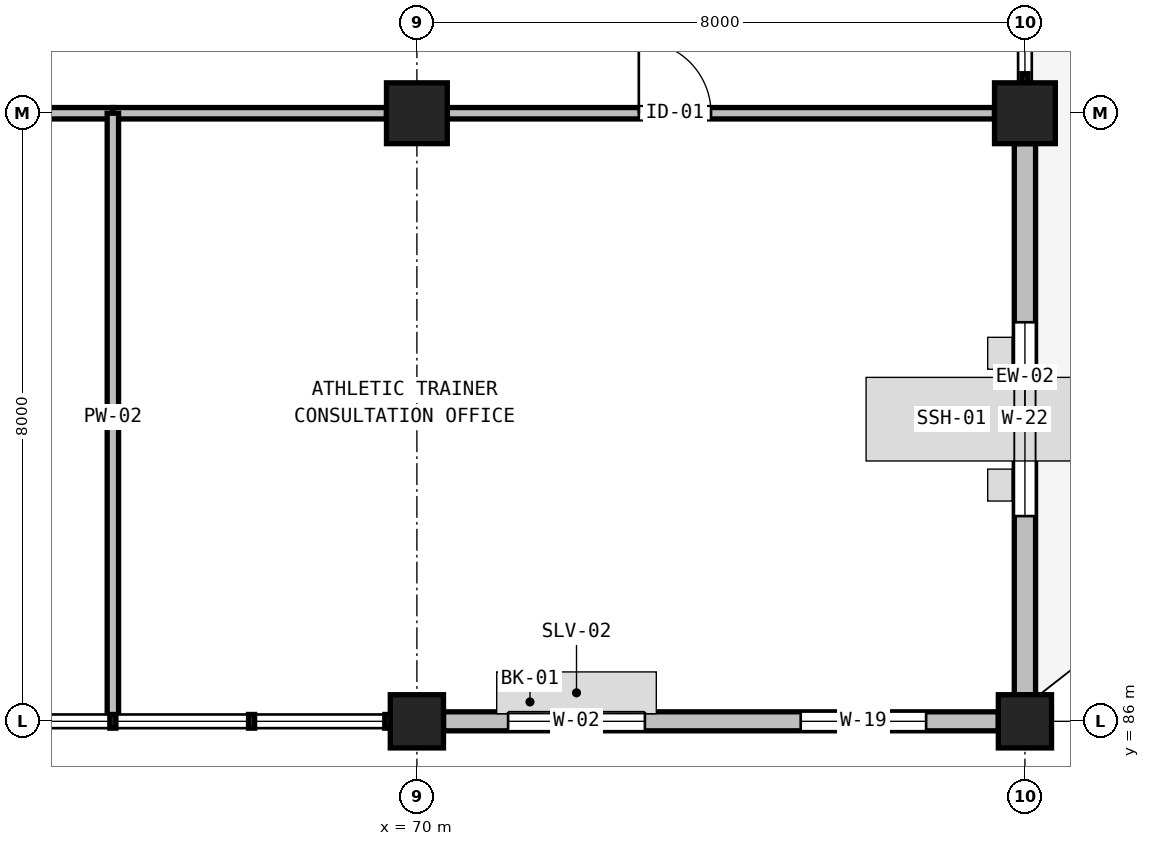
"""IFC4 building model, lengths in metres.
Left out: names, types, materials, properties, quantities, classifications, styles, units other than length and angle.
Written with IfcOpenShell. Run it as: python <this file> out.ifc"""

import sys

from ifc_helpers import new_model, si_unit, direction, frame, frame_2d, origin, origin_2d, place, context, subcontext, project, spatial, rectangle, extrude, element, fill, save


model = new_model("IFC4")
c1 = context("Model", 3, precision=1e-05, world=origin(), true_north=direction((0.0, 1.0)))
c2 = subcontext(c1, "Body", "Model", "MODEL_VIEW")
j1 = project(units=[si_unit("LENGTHUNIT", "METRE"), si_unit("PLANEANGLEUNIT", "RADIAN")], contexts=[c1])
p1 = place(None, origin())
s1 = spatial("IfcSite", under=j1, at=p1, CompositionType="ELEMENT")
p2 = place(p1, origin())
s2 = spatial("IfcBuilding", under=s1, at=p2, CompositionType="ELEMENT")
p3 = place(p2, frame((0.0, 0.0, 5.4)))
s3 = spatial("IfcBuildingStorey", under=s2, at=p3, CompositionType="ELEMENT", Elevation=5.4)
p4 = place(p3, frame((70.0, 86.0, 0.0), z_axis=(0.0, 0.0, 1.0), x_axis=(1.0, 0.0, 0.0)))
e1 = element("IfcColumn", 1, at=p4, inside=s3, PredefinedType="COLUMN", context=c2, shape_type="SweptSolid", body=[
    extrude(rectangle(XDim=0.7, YDim=0.7, at=origin_2d()), origin(), (0.0, 0.0, 1.0), 5.4),
])
p5 = place(p3, frame((70.0, 94.0, 0.0), z_axis=(0.0, 0.0, 1.0), x_axis=(1.0, 0.0, 0.0)))
e2 = element("IfcColumn", 2, at=p5, inside=s3, PredefinedType="COLUMN", context=c2, shape_type="SweptSolid", body=[
    extrude(rectangle(XDim=0.8, YDim=0.8, at=origin_2d()), origin(), (0.0, 0.0, 1.0), 5.4),
])
p6 = place(p3, frame((78.0, 86.0, 0.0), z_axis=(0.0, 0.0, 1.0), x_axis=(1.0, 0.0, 0.0)))
e3 = element("IfcColumn", 3, at=p6, inside=s3, PredefinedType="COLUMN", context=c2, shape_type="SweptSolid", body=[
    extrude(rectangle(XDim=0.7, YDim=0.7, at=origin_2d()), origin(), (0.0, 0.0, 1.0), 5.4),
])
p7 = place(p3, frame((78.0, 94.0, 0.0), z_axis=(0.0, 0.0, 1.0), x_axis=(1.0, 0.0, 0.0)))
e4 = element("IfcColumn", 4, at=p7, inside=s3, PredefinedType="COLUMN", context=c2, shape_type="SweptSolid", body=[
    extrude(rectangle(XDim=0.8, YDim=0.8, at=origin_2d()), origin(), (0.0, 0.0, 1.0), 5.4),
])
p8 = place(p3, frame((70.35, 86.0, 0.0), z_axis=(0.0, 0.0, 1.0), x_axis=(1.0, 0.0, 0.0)))
e5 = element("IfcWall", 5, at=p8, inside=s3, PredefinedType="SOLIDWALL", context=c2, shape_type="SweptSolid", body=[
    extrude(rectangle(XDim=7.3, YDim=0.25, at=frame_2d((3.65, 0.0))), origin(), (0.0, 0.0, 1.0), 4.34),
])
p9 = place(p8, frame((0.85, 0.0, 0.9)))
e6 = element("IfcOpeningElement", 6, at=p9, cuts=e5, PredefinedType="OPENING", context=c2, shape_type="SweptSolid", body=[
    extrude(rectangle(XDim=1.8, YDim=1.8, at=frame_2d((0.9, 0.9))), frame((0.0, 0.135, 0.0), z_axis=(0.0, -1.0, 0.0), x_axis=(1.0, 0.0, 0.0)), (0.0, 0.0, 1.0), 0.27),
])
p10 = place(p8, frame((4.7, 0.0, 0.95)))
e7 = element("IfcOpeningElement", 7, at=p10, cuts=e5, PredefinedType="OPENING", context=c2, shape_type="SweptSolid", body=[
    extrude(rectangle(XDim=1.65, YDim=1.85, at=frame_2d((0.825, 0.925))), frame((0.0, 0.135, 0.0), z_axis=(0.0, -1.0, 0.0), x_axis=(1.0, 0.0, 0.0)), (0.0, 0.0, 1.0), 0.27),
])
p11 = place(p3, frame((78.0, 86.35, 0.0), z_axis=(0.0, 0.0, 1.0), x_axis=(0.0, 1.0, 0.0)))
e8 = element("IfcWall", 8, at=p11, inside=s3, PredefinedType="SOLIDWALL", context=c2, shape_type="SweptSolid", body=[
    extrude(rectangle(XDim=7.25, YDim=0.28, at=frame_2d((3.625, 0.0))), origin(), (0.0, 0.0, 1.0), 4.24),
])
p12 = place(p11, frame((2.35, 0.0, 0.95)))
e9 = element("IfcOpeningElement", 9, at=p12, cuts=e8, PredefinedType="OPENING", context=c2, shape_type="SweptSolid", body=[
    extrude(rectangle(XDim=2.55, YDim=1.85, at=frame_2d((1.275, 0.925))), frame((0.0, 0.15, 0.0), z_axis=(0.0, -1.0, 0.0), x_axis=(1.0, 0.0, 0.0)), (0.0, 0.0, 1.0), 0.3),
])
p13 = place(p3, frame((62.4, 94.0, 0.0), z_axis=(0.0, 0.0, 1.0), x_axis=(1.0, 0.0, 0.0)))
e10 = element("IfcWall", 10, at=p13, inside=s3, PredefinedType="PARTITIONING", context=c2, shape_type="SweptSolid", body=[
    extrude(rectangle(XDim=3.6, YDim=0.15, at=frame_2d((1.8, 0.0))), origin(), (0.0, 0.0, 1.0), 4.14),
])
p14 = place(p13, frame((0.9, 0.0, 0.0)))
e11 = element("IfcOpeningElement", 11, at=p14, cuts=e10, PredefinedType="OPENING", context=c2, shape_type="SweptSolid", body=[
    extrude(rectangle(XDim=1.0, YDim=2.15, at=frame_2d((0.5, 1.075))), frame((0.0, 0.085, 0.0), z_axis=(0.0, -1.0, 0.0), x_axis=(1.0, 0.0, 0.0)), (0.0, 0.0, 1.0), 0.17),
])
p15 = place(p3, frame((66.0, 94.0, 0.0), z_axis=(0.0, 0.0, 1.0), x_axis=(1.0, 0.0, 0.0)))
e12 = element("IfcWall", 12, at=p15, inside=s3, PredefinedType="PARTITIONING", context=c2, shape_type="SweptSolid", body=[
    extrude(rectangle(XDim=3.6, YDim=0.15, at=frame_2d((1.8, 0.0))), origin(), (0.0, 0.0, 1.0), 4.14),
])
p16 = place(p3, frame((70.4, 94.0, 0.0), z_axis=(0.0, 0.0, 1.0), x_axis=(1.0, 0.0, 0.0)))
e13 = element("IfcWall", 13, at=p16, inside=s3, PredefinedType="PARTITIONING", context=c2, shape_type="SweptSolid", body=[
    extrude(rectangle(XDim=7.2, YDim=0.15, at=frame_2d((3.6, 0.0))), origin(), (0.0, 0.0, 1.0), 4.14),
])
p17 = place(p16, frame((2.52, 0.0, 0.0)))
e14 = element("IfcOpeningElement", 14, at=p17, cuts=e13, PredefinedType="OPENING", context=c2, shape_type="SweptSolid", body=[
    extrude(rectangle(XDim=0.95, YDim=2.1, at=frame_2d((0.475, 1.05))), frame((0.0, 0.085, 0.0), z_axis=(0.0, -1.0, 0.0), x_axis=(1.0, 0.0, 0.0)), (0.0, 0.0, 1.0), 0.17),
])
p18 = place(p3, frame((66.0, 86.0, 0.0), z_axis=(0.0, 0.0, 1.0), x_axis=(0.0, 1.0, 0.0)))
e15 = element("IfcWall", 15, at=p18, inside=s3, PredefinedType="PARTITIONING", context=c2, shape_type="SweptSolid", body=[
    extrude(rectangle(XDim=8.0, YDim=0.15, at=frame_2d((4.0, 0.0))), origin(), (0.0, 0.0, 1.0), 5.1),
])
p19 = place(p9, origin())
e16 = element("IfcWindow", 16, at=p19, inside=s3, PartitioningType="SINGLE_PANEL", PredefinedType="WINDOW", context=c2, shape_type="SweptSolid", body=[
    extrude(rectangle(XDim=1.8, YDim=1.8, at=frame_2d((0.9, 0.9))), frame((0.0, 0.03, 0.0), z_axis=(0.0, -1.0, 0.0), x_axis=(1.0, 0.0, 0.0)), (0.0, 0.0, 1.0), 0.06),
])
fill(e6, e16)
p20 = place(p10, origin())
e17 = element("IfcWindow", 17, at=p20, inside=s3, PartitioningType="SINGLE_PANEL", PredefinedType="WINDOW", context=c2, shape_type="SweptSolid", body=[
    extrude(rectangle(XDim=1.65, YDim=1.85, at=frame_2d((0.825, 0.925))), frame((0.0, 0.03, 0.0), z_axis=(0.0, -1.0, 0.0), x_axis=(1.0, 0.0, 0.0)), (0.0, 0.0, 1.0), 0.06),
])
fill(e7, e17)
p21 = place(p12, origin())
e18 = element("IfcWindow", 18, at=p21, inside=s3, PartitioningType="SINGLE_PANEL", PredefinedType="WINDOW", context=c2, shape_type="SweptSolid", body=[
    extrude(rectangle(XDim=2.55, YDim=1.85, at=frame_2d((1.275, 0.925))), frame((0.0, 0.03, 0.0), z_axis=(0.0, -1.0, 0.0), x_axis=(1.0, 0.0, 0.0)), (0.0, 0.0, 1.0), 0.06),
])
fill(e9, e18)
p22 = place(p17, origin())
e19 = element("IfcDoor", 19, at=p22, inside=s3, OperationType="SINGLE_SWING_LEFT", PredefinedType="DOOR", context=c2, shape_type="SweptSolid", body=[
    extrude(rectangle(XDim=0.95, YDim=2.1, at=frame_2d((0.475, 1.05))), frame((0.0, 0.025, 0.0), z_axis=(0.0, -1.0, 0.0), x_axis=(1.0, 0.0, 0.0)), (0.0, 0.0, 1.0), 0.05),
])
fill(e14, e19)
save(model, sys.argv[1])
